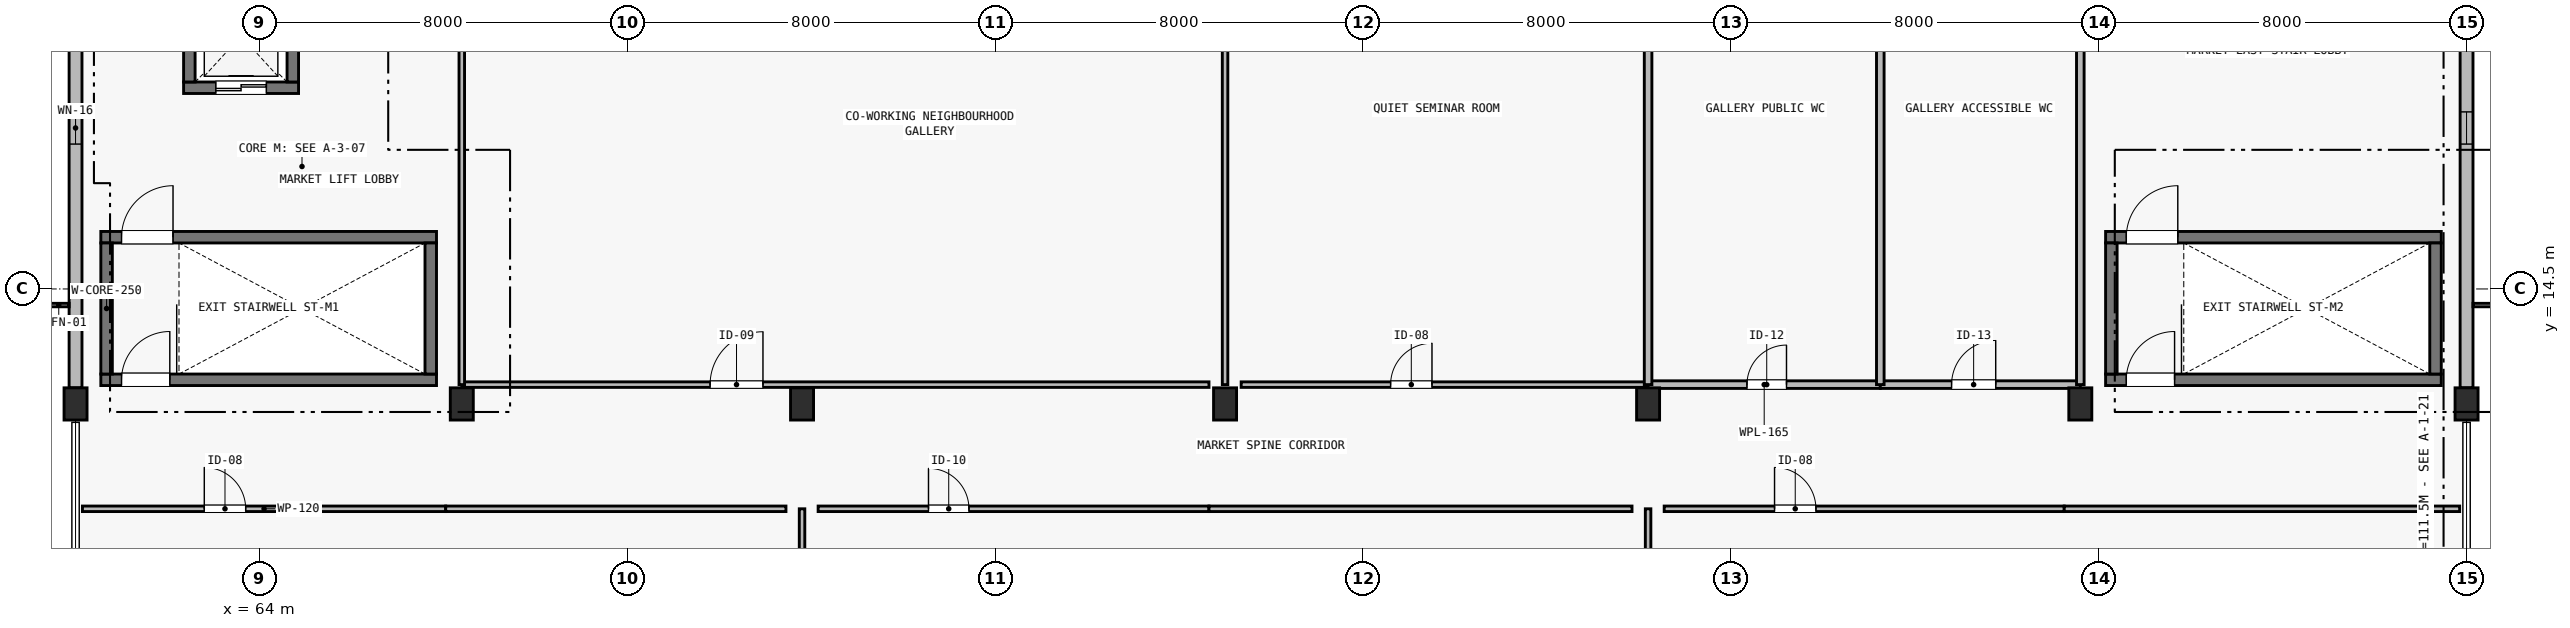
"""IFC4 building model, lengths in metres.
Left out: names, types, materials, properties, quantities, classifications, styles, units other than length and angle.
Written with IfcOpenShell. Run it as: python <this file> out.ifc"""

import sys

from ifc_helpers import new_model, si_unit, direction, frame, frame_2d, origin, origin_2d, place, context, subcontext, project, spatial, rectangle, extrude, element, fill, save


model = new_model("IFC4")
c1 = context("Model", 3, precision=1e-05, world=origin(), true_north=direction((0.0, 1.0)))
c2 = subcontext(c1, "Body", "Model", "MODEL_VIEW")
j1 = project(units=[si_unit("LENGTHUNIT", "METRE"), si_unit("PLANEANGLEUNIT", "RADIAN")], contexts=[c1])
p1 = place(None, origin())
s1 = spatial("IfcSite", under=j1, at=p1, CompositionType="ELEMENT")
p2 = place(p1, origin())
s2 = spatial("IfcBuilding", under=s1, at=p2, CompositionType="ELEMENT")
p3 = place(p2, frame((0.0, 0.0, 8.4)))
s3 = spatial("IfcBuildingStorey", under=s2, at=p3, CompositionType="ELEMENT", Elevation=8.4)
p4 = place(p3, frame((60.55, 12.525, 0.0), z_axis=(0.0, 0.0, 1.0), x_axis=(1.0, 0.0, 0.0)))
e1 = element("IfcWall", 1, at=p4, inside=s3, PredefinedType="SHEAR", context=c2, shape_type="SweptSolid", body=[
    extrude(rectangle(XDim=7.3, YDim=0.25, at=frame_2d((3.65, 0.0))), origin(), (0.0, 0.0, 1.0), 3.25),
])
p5 = place(p4, frame((0.45, 0.0, 0.0)))
e2 = element("IfcOpeningElement", 2, at=p5, cuts=e1, PredefinedType="OPENING", context=c2, shape_type="SweptSolid", body=[
    extrude(rectangle(XDim=1.05, YDim=2.15, at=frame_2d((0.525, 1.075))), frame((0.0, 0.14, 0.0), z_axis=(0.0, -1.0, 0.0), x_axis=(1.0, 0.0, 0.0)), (0.0, 0.0, 1.0), 0.28),
])
p6 = place(p3, frame((60.55, 15.625, 0.0), z_axis=(0.0, 0.0, 1.0), x_axis=(1.0, 0.0, 0.0)))
e3 = element("IfcWall", 3, at=p6, inside=s3, PredefinedType="SHEAR", context=c2, shape_type="SweptSolid", body=[
    extrude(rectangle(XDim=7.3, YDim=0.25, at=frame_2d((3.65, 0.0))), origin(), (0.0, 0.0, 1.0), 3.25),
])
p7 = place(p6, frame((0.45, 0.0, 0.0)))
e4 = element("IfcOpeningElement", 4, at=p7, cuts=e3, PredefinedType="OPENING", context=c2, shape_type="SweptSolid", body=[
    extrude(rectangle(XDim=1.12, YDim=2.15, at=frame_2d((0.56, 1.075))), frame((0.0, 0.14, 0.0), z_axis=(0.0, -1.0, 0.0), x_axis=(1.0, 0.0, 0.0)), (0.0, 0.0, 1.0), 0.28),
])
for number, where, z_axis, x_axis in (
    (5, (60.675, 12.65, 0.0), (0.0, 0.0, 1.0), (0.0, 1.0, 0.0)),
    (6, (67.725, 12.65, 0.0), (0.0, 0.0, 1.0), (0.0, 1.0, 0.0)),
):
    element("IfcWall", number, at=place(p3, frame(where, z_axis=z_axis, x_axis=x_axis)), inside=s3, PredefinedType="SHEAR", context=c2, shape_type="SweptSolid", body=[
        extrude(rectangle(XDim=2.85, YDim=0.25, at=frame_2d((1.425, 0.0))), origin(), (0.0, 0.0, 1.0), 3.25),
    ])
p8 = place(p3, frame((104.15, 12.525, 0.0), z_axis=(0.0, 0.0, 1.0), x_axis=(1.0, 0.0, 0.0)))
e7 = element("IfcWall", 7, at=p8, inside=s3, PredefinedType="SHEAR", context=c2, shape_type="SweptSolid", body=[
    extrude(rectangle(XDim=7.3, YDim=0.25, at=frame_2d((3.65, 0.0))), origin(), (0.0, 0.0, 1.0), 3.25),
])
p9 = place(p8, frame((0.45, 0.0, 0.0)))
e8 = element("IfcOpeningElement", 8, at=p9, cuts=e7, PredefinedType="OPENING", context=c2, shape_type="SweptSolid", body=[
    extrude(rectangle(XDim=1.05, YDim=2.15, at=frame_2d((0.525, 1.075))), frame((0.0, 0.14, 0.0), z_axis=(0.0, -1.0, 0.0), x_axis=(1.0, 0.0, 0.0)), (0.0, 0.0, 1.0), 0.28),
])
p10 = place(p3, frame((104.15, 15.625, 0.0), z_axis=(0.0, 0.0, 1.0), x_axis=(1.0, 0.0, 0.0)))
e9 = element("IfcWall", 9, at=p10, inside=s3, PredefinedType="SHEAR", context=c2, shape_type="SweptSolid", body=[
    extrude(rectangle(XDim=7.3, YDim=0.25, at=frame_2d((3.65, 0.0))), origin(), (0.0, 0.0, 1.0), 3.25),
])
p11 = place(p10, frame((0.45, 0.0, 0.0)))
e10 = element("IfcOpeningElement", 10, at=p11, cuts=e9, PredefinedType="OPENING", context=c2, shape_type="SweptSolid", body=[
    extrude(rectangle(XDim=1.12, YDim=2.15, at=frame_2d((0.56, 1.075))), frame((0.0, 0.14, 0.0), z_axis=(0.0, -1.0, 0.0), x_axis=(1.0, 0.0, 0.0)), (0.0, 0.0, 1.0), 0.28),
])
for number, where, z_axis, x_axis in (
    (11, (104.275, 12.65, 0.0), (0.0, 0.0, 1.0), (0.0, 1.0, 0.0)),
    (12, (111.325, 12.65, 0.0), (0.0, 0.0, 1.0), (0.0, 1.0, 0.0)),
):
    element("IfcWall", number, at=place(p3, frame(where, z_axis=z_axis, x_axis=x_axis)), inside=s3, PredefinedType="SHEAR", context=c2, shape_type="SweptSolid", body=[
        extrude(rectangle(XDim=2.85, YDim=0.25, at=frame_2d((1.425, 0.0))), origin(), (0.0, 0.0, 1.0), 3.25),
    ])
p12 = place(p3, frame((62.35, 18.875, 0.0), z_axis=(0.0, 0.0, 1.0), x_axis=(1.0, 0.0, 0.0)))
e13 = element("IfcWall", 13, at=p12, inside=s3, PredefinedType="SHEAR", context=c2, shape_type="SweptSolid", body=[
    extrude(rectangle(XDim=2.5, YDim=0.25, at=frame_2d((1.25, 0.0))), origin(), (0.0, 0.0, 1.0), 3.25),
])
p13 = place(p12, frame((0.7, 0.0, 0.0)))
e14 = element("IfcOpeningElement", 14, at=p13, cuts=e13, PredefinedType="OPENING", context=c2, shape_type="SweptSolid", body=[
    extrude(rectangle(XDim=1.1, YDim=2.15, at=frame_2d((0.55, 1.075))), frame((0.0, 0.14, 0.0), z_axis=(0.0, -1.0, 0.0), x_axis=(1.0, 0.0, 0.0)), (0.0, 0.0, 1.0), 0.28),
])
for number, where, z_axis, x_axis in (
    (15, (62.475, 19.0, 0.0), (0.0, 0.0, 1.0), (0.0, 1.0, 0.0)),
    (16, (64.725, 19.0, 0.0), (0.0, 0.0, 1.0), (0.0, 1.0, 0.0)),
):
    element("IfcWall", number, at=place(p3, frame(where, z_axis=z_axis, x_axis=x_axis)), inside=s3, PredefinedType="SHEAR", context=c2, shape_type="SweptSolid", body=[
        extrude(rectangle(XDim=2.0, YDim=0.25, at=frame_2d((1.0, 0.0))), origin(), (0.0, 0.0, 1.0), 3.25),
    ])
for number, where, z_axis, x_axis in (
    (17, (60.0, 12.0, 0.0), (0.0, 0.0, 1.0), (1.0, 0.0, 0.0)),
    (18, (68.4, 12.0, 0.0), (0.0, 0.0, 1.0), (1.0, 0.0, 0.0)),
    (19, (75.8, 12.0, 0.0), (0.0, 0.0, 1.0), (1.0, 0.0, 0.0)),
    (20, (85.0, 12.0, 0.0), (0.0, 0.0, 1.0), (1.0, 0.0, 0.0)),
    (21, (94.2, 12.0, 0.0), (0.0, 0.0, 1.0), (1.0, 0.0, 0.0)),
    (22, (103.6, 12.0, 0.0), (0.0, 0.0, 1.0), (1.0, 0.0, 0.0)),
    (23, (112.0, 12.0, 0.0), (0.0, 0.0, 1.0), (1.0, 0.0, 0.0)),
):
    element("IfcColumn", number, at=place(p3, frame(where, z_axis=z_axis, x_axis=x_axis)), inside=s3, PredefinedType="COLUMN", context=c2, shape_type="SweptSolid", body=[
        extrude(rectangle(XDim=0.5, YDim=0.7, at=origin_2d()), origin(), (0.0, 0.0, 1.0), 4.095),
    ])
p14 = place(p3, frame((60.0, 12.35, 0.0), z_axis=(0.0, 0.0, 1.0), x_axis=(0.0, 1.0, 0.0)))
e24 = element("IfcWall", 24, at=p14, inside=s3, PredefinedType="SOLIDWALL", context=c2, shape_type="SweptSolid", body=[
    extrude(rectangle(XDim=11.3, YDim=0.28, at=frame_2d((5.65, 0.0))), origin(), (0.0, 0.0, 1.0), 2.34),
])
p15 = place(p14, frame((5.3, 0.0, 0.16)))
e25 = element("IfcOpeningElement", 25, at=p15, cuts=e24, PredefinedType="OPENING", context=c2, shape_type="SweptSolid", body=[
    extrude(rectangle(XDim=0.7, YDim=2.14, at=frame_2d((0.35, 1.07))), frame((0.0, 0.155, 0.0), z_axis=(0.0, -1.0, 0.0), x_axis=(1.0, 0.0, 0.0)), (0.0, 0.0, 1.0), 0.31),
])
p16 = place(p3, frame((112.0, 23.65, 0.0), z_axis=(0.0, 0.0, 1.0), x_axis=(0.0, -1.0, 0.0)))
e26 = element("IfcWall", 26, at=p16, inside=s3, PredefinedType="SOLIDWALL", context=c2, shape_type="SweptSolid", body=[
    extrude(rectangle(XDim=11.3, YDim=0.28, at=frame_2d((5.65, 0.0))), origin(), (0.0, 0.0, 1.0), 2.34),
])
p17 = place(p16, frame((5.3, 0.0, 0.16)))
e27 = element("IfcOpeningElement", 27, at=p17, cuts=e26, PredefinedType="OPENING", context=c2, shape_type="SweptSolid", body=[
    extrude(rectangle(XDim=0.7, YDim=2.14, at=frame_2d((0.35, 1.07))), frame((0.0, 0.155, 0.0), z_axis=(0.0, -1.0, 0.0), x_axis=(1.0, 0.0, 0.0)), (0.0, 0.0, 1.0), 0.31),
])
p18 = place(p3, frame((60.15, 9.72, 0.0), z_axis=(0.0, 0.0, 1.0), x_axis=(1.0, 0.0, 0.0)))
e28 = element("IfcWall", 28, at=p18, inside=s3, PredefinedType="PARTITIONING", context=c2, shape_type="SweptSolid", body=[
    extrude(rectangle(XDim=7.9, YDim=0.12, at=frame_2d((3.95, 0.0))), origin(), (0.0, 0.0, 1.0), 2.98),
])
p19 = place(p18, frame((2.65, 0.0, 0.0)))
e29 = element("IfcOpeningElement", 29, at=p19, cuts=e28, PredefinedType="OPENING", context=c2, shape_type="SweptSolid", body=[
    extrude(rectangle(XDim=0.9, YDim=2.1, at=frame_2d((0.45, 1.05))), frame((0.0, 0.075, 0.0), z_axis=(0.0, -1.0, 0.0), x_axis=(1.0, 0.0, 0.0)), (0.0, 0.0, 1.0), 0.15),
])
p20 = place(p3, frame((68.05, 9.72, 0.0), z_axis=(0.0, 0.0, 1.0), x_axis=(1.0, 0.0, 0.0)))
e30 = element("IfcWall", 30, at=p20, inside=s3, PredefinedType="PARTITIONING", context=c2, shape_type="SweptSolid", body=[
    extrude(rectangle(XDim=7.4, YDim=0.12, at=frame_2d((3.7, 0.0))), origin(), (0.0, 0.0, 1.0), 2.98),
])
p21 = place(p3, frame((76.15, 9.72, 0.0), z_axis=(0.0, 0.0, 1.0), x_axis=(1.0, 0.0, 0.0)))
e31 = element("IfcWall", 31, at=p21, inside=s3, PredefinedType="PARTITIONING", context=c2, shape_type="SweptSolid", body=[
    extrude(rectangle(XDim=8.5, YDim=0.12, at=frame_2d((4.25, 0.0))), origin(), (0.0, 0.0, 1.0), 2.98),
])
p22 = place(p21, frame((2.4, 0.0, 0.0)))
e32 = element("IfcOpeningElement", 32, at=p22, cuts=e31, PredefinedType="OPENING", context=c2, shape_type="SweptSolid", body=[
    extrude(rectangle(XDim=0.88, YDim=2.1, at=frame_2d((0.44, 1.05))), frame((0.0, 0.075, 0.0), z_axis=(0.0, -1.0, 0.0), x_axis=(1.0, 0.0, 0.0)), (0.0, 0.0, 1.0), 0.15),
])
p23 = place(p3, frame((84.65, 9.72, 0.0), z_axis=(0.0, 0.0, 1.0), x_axis=(1.0, 0.0, 0.0)))
e33 = element("IfcWall", 33, at=p23, inside=s3, PredefinedType="PARTITIONING", context=c2, shape_type="SweptSolid", body=[
    extrude(rectangle(XDim=9.2, YDim=0.12, at=frame_2d((4.6, 0.0))), origin(), (0.0, 0.0, 1.0), 2.98),
])
p24 = place(p3, frame((94.55, 9.72, 0.0), z_axis=(0.0, 0.0, 1.0), x_axis=(1.0, 0.0, 0.0)))
e34 = element("IfcWall", 34, at=p24, inside=s3, PredefinedType="PARTITIONING", context=c2, shape_type="SweptSolid", body=[
    extrude(rectangle(XDim=8.7, YDim=0.12, at=frame_2d((4.35, 0.0))), origin(), (0.0, 0.0, 1.0), 2.98),
])
p25 = place(p24, frame((2.4, 0.0, 0.0)))
e35 = element("IfcOpeningElement", 35, at=p25, cuts=e34, PredefinedType="OPENING", context=c2, shape_type="SweptSolid", body=[
    extrude(rectangle(XDim=0.9, YDim=2.1, at=frame_2d((0.45, 1.05))), frame((0.0, 0.075, 0.0), z_axis=(0.0, -1.0, 0.0), x_axis=(1.0, 0.0, 0.0)), (0.0, 0.0, 1.0), 0.15),
])
p26 = place(p3, frame((103.25, 9.72, 0.0), z_axis=(0.0, 0.0, 1.0), x_axis=(1.0, 0.0, 0.0)))
e36 = element("IfcWall", 36, at=p26, inside=s3, PredefinedType="PARTITIONING", context=c2, shape_type="SweptSolid", body=[
    extrude(rectangle(XDim=8.6, YDim=0.12, at=frame_2d((4.3, 0.0))), origin(), (0.0, 0.0, 1.0), 2.98),
])
for number, where, z_axis, x_axis in (
    (37, (75.8, 0.12, 0.0), (0.0, 0.0, 1.0), (0.0, 1.0, 0.0)),
    (38, (94.2, 0.12, 0.0), (0.0, 0.0, 1.0), (0.0, 1.0, 0.0)),
):
    element("IfcWall", number, at=place(p3, frame(where, z_axis=z_axis, x_axis=x_axis)), inside=s3, PredefinedType="PARTITIONING", context=c2, shape_type="SweptSolid", body=[
        extrude(rectangle(XDim=9.6, YDim=0.12, at=frame_2d((4.8, 0.0))), origin(), (0.0, 0.0, 1.0), 2.35),
    ])
p27 = place(p3, frame((68.4, 12.42, 0.0), z_axis=(0.0, 0.0, 1.0), x_axis=(1.0, 0.0, 0.0)))
e39 = element("IfcWall", 39, at=p27, inside=s3, PredefinedType="PARTITIONING", context=c2, shape_type="SweptSolid", body=[
    extrude(rectangle(XDim=16.25, YDim=0.12, at=frame_2d((8.125, 0.0))), origin(), (0.0, 0.0, 1.0), 2.98),
])
p28 = place(p27, frame((5.4, 0.0, 0.0)))
e40 = element("IfcOpeningElement", 40, at=p28, cuts=e39, PredefinedType="OPENING", context=c2, shape_type="SweptSolid", body=[
    extrude(rectangle(XDim=1.15, YDim=2.15, at=frame_2d((0.575, 1.075))), frame((0.0, 0.075, 0.0), z_axis=(0.0, -1.0, 0.0), x_axis=(1.0, 0.0, 0.0)), (0.0, 0.0, 1.0), 0.15),
])
p29 = place(p3, frame((85.35, 12.42, 0.0), z_axis=(0.0, 0.0, 1.0), x_axis=(1.0, 0.0, 0.0)))
e41 = element("IfcWall", 41, at=p29, inside=s3, PredefinedType="PARTITIONING", context=c2, shape_type="SweptSolid", body=[
    extrude(rectangle(XDim=8.85, YDim=0.12, at=frame_2d((4.425, 0.0))), origin(), (0.0, 0.0, 1.0), 2.98),
])
p30 = place(p29, frame((3.25, 0.0, 0.0)))
e42 = element("IfcOpeningElement", 42, at=p30, cuts=e41, PredefinedType="OPENING", context=c2, shape_type="SweptSolid", body=[
    extrude(rectangle(XDim=0.9, YDim=2.1, at=frame_2d((0.45, 1.05))), frame((0.0, 0.075, 0.0), z_axis=(0.0, -1.0, 0.0), x_axis=(1.0, 0.0, 0.0)), (0.0, 0.0, 1.0), 0.15),
])
p31 = place(p3, frame((94.2, 12.42, 0.0), z_axis=(0.0, 0.0, 1.0), x_axis=(1.0, 0.0, 0.0)))
e43 = element("IfcWall", 43, at=p31, inside=s3, PredefinedType="PLUMBINGWALL", context=c2, shape_type="SweptSolid", body=[
    extrude(rectangle(XDim=5.05, YDim=0.165, at=frame_2d((2.525, 0.0))), origin(), (0.0, 0.0, 1.0), 2.98),
])
p32 = place(p31, frame((2.15, 0.0, 0.0)))
e44 = element("IfcOpeningElement", 44, at=p32, cuts=e43, PredefinedType="OPENING", context=c2, shape_type="SweptSolid", body=[
    extrude(rectangle(XDim=0.86, YDim=2.1, at=frame_2d((0.43, 1.05))), frame((0.0, 0.097, 0.0), z_axis=(0.0, -1.0, 0.0), x_axis=(1.0, 0.0, 0.0)), (0.0, 0.0, 1.0), 0.195),
])
p33 = place(p3, frame((99.25, 12.42, 0.0), z_axis=(0.0, 0.0, 1.0), x_axis=(1.0, 0.0, 0.0)))
e45 = element("IfcWall", 45, at=p33, inside=s3, PredefinedType="PLUMBINGWALL", context=c2, shape_type="SweptSolid", body=[
    extrude(rectangle(XDim=4.35, YDim=0.165, at=frame_2d((2.175, 0.0))), origin(), (0.0, 0.0, 1.0), 2.98),
])
p34 = place(p33, frame((1.55, 0.0, 0.0)))
e46 = element("IfcOpeningElement", 46, at=p34, cuts=e45, PredefinedType="OPENING", context=c2, shape_type="SweptSolid", body=[
    extrude(rectangle(XDim=0.96, YDim=2.12, at=frame_2d((0.48, 1.06))), frame((0.0, 0.097, 0.0), z_axis=(0.0, -1.0, 0.0), x_axis=(1.0, 0.0, 0.0)), (0.0, 0.0, 1.0), 0.195),
])
for number, where, z_axis, x_axis in (
    (47, (68.4, 12.42, 0.0), (0.0, 0.0, 1.0), (0.0, 1.0, 0.0)),
    (48, (85.0, 12.42, 0.0), (0.0, 0.0, 1.0), (0.0, 1.0, 0.0)),
):
    element("IfcWall", number, at=place(p3, frame(where, z_axis=z_axis, x_axis=x_axis)), inside=s3, PredefinedType="PARTITIONING", context=c2, shape_type="SweptSolid", body=[
        extrude(rectangle(XDim=11.54, YDim=0.12, at=frame_2d((5.77, 0.0))), origin(), (0.0, 0.0, 1.0), 2.35),
    ])
p35 = place(p3, frame((94.2, 12.42, 0.0), z_axis=(0.0, 0.0, 1.0), x_axis=(0.0, 1.0, 0.0)))
e49 = element("IfcWall", 49, at=p35, inside=s3, PredefinedType="PLUMBINGWALL", context=c2, shape_type="SweptSolid", body=[
    extrude(rectangle(XDim=11.54, YDim=0.165, at=frame_2d((5.77, 0.0))), origin(), (0.0, 0.0, 1.0), 2.35),
])
p36 = place(p3, frame((99.25, 12.42, 0.0), z_axis=(0.0, 0.0, 1.0), x_axis=(0.0, 1.0, 0.0)))
e50 = element("IfcWall", 50, at=p36, inside=s3, PredefinedType="PLUMBINGWALL", context=c2, shape_type="SweptSolid", body=[
    extrude(rectangle(XDim=11.54, YDim=0.165, at=frame_2d((5.77, 0.0))), origin(), (0.0, 0.0, 1.0), 2.98),
])
p37 = place(p3, frame((103.6, 12.42, 0.0), z_axis=(0.0, 0.0, 1.0), x_axis=(0.0, 1.0, 0.0)))
e51 = element("IfcWall", 51, at=p37, inside=s3, PredefinedType="PLUMBINGWALL", context=c2, shape_type="SweptSolid", body=[
    extrude(rectangle(XDim=11.54, YDim=0.165, at=frame_2d((5.77, 0.0))), origin(), (0.0, 0.0, 1.0), 2.35),
])
p38 = place(p15, origin())
e52 = element("IfcWindow", 52, at=p38, inside=s3, PartitioningType="SINGLE_PANEL", PredefinedType="WINDOW", context=c2, shape_type="SweptSolid", body=[
    extrude(rectangle(XDim=0.7, YDim=2.14, at=frame_2d((0.35, 1.07))), frame((0.0, 0.03, 0.0), z_axis=(0.0, -1.0, 0.0), x_axis=(1.0, 0.0, 0.0)), (0.0, 0.0, 1.0), 0.06),
])
fill(e25, e52)
p39 = place(p17, origin())
e53 = element("IfcWindow", 53, at=p39, inside=s3, PartitioningType="SINGLE_PANEL", PredefinedType="WINDOW", context=c2, shape_type="SweptSolid", body=[
    extrude(rectangle(XDim=0.7, YDim=2.14, at=frame_2d((0.35, 1.07))), frame((0.0, 0.03, 0.0), z_axis=(0.0, -1.0, 0.0), x_axis=(1.0, 0.0, 0.0)), (0.0, 0.0, 1.0), 0.06),
])
fill(e27, e53)
p40 = place(p19, origin())
e54 = element("IfcDoor", 54, at=p40, inside=s3, OperationType="SINGLE_SWING_LEFT", PredefinedType="DOOR", context=c2, shape_type="SweptSolid", body=[
    extrude(rectangle(XDim=0.9, YDim=2.1, at=frame_2d((0.45, 1.05))), frame((0.0, 0.025, 0.0), z_axis=(0.0, -1.0, 0.0), x_axis=(1.0, 0.0, 0.0)), (0.0, 0.0, 1.0), 0.05),
])
fill(e29, e54)
p41 = place(p22, origin())
e55 = element("IfcDoor", 55, at=p41, inside=s3, OperationType="SINGLE_SWING_LEFT", PredefinedType="DOOR", context=c2, shape_type="SweptSolid", body=[
    extrude(rectangle(XDim=0.88, YDim=2.1, at=frame_2d((0.44, 1.05))), frame((0.0, 0.025, 0.0), z_axis=(0.0, -1.0, 0.0), x_axis=(1.0, 0.0, 0.0)), (0.0, 0.0, 1.0), 0.05),
])
fill(e32, e55)
p42 = place(p25, origin())
e56 = element("IfcDoor", 56, at=p42, inside=s3, OperationType="SINGLE_SWING_LEFT", PredefinedType="DOOR", context=c2, shape_type="SweptSolid", body=[
    extrude(rectangle(XDim=0.9, YDim=2.1, at=frame_2d((0.45, 1.05))), frame((0.0, 0.025, 0.0), z_axis=(0.0, -1.0, 0.0), x_axis=(1.0, 0.0, 0.0)), (0.0, 0.0, 1.0), 0.05),
])
fill(e35, e56)
p43 = place(p28, origin())
e57 = element("IfcDoor", 57, at=p43, inside=s3, OperationType="SINGLE_SWING_RIGHT", PredefinedType="DOOR", context=c2, shape_type="SweptSolid", body=[
    extrude(rectangle(XDim=1.15, YDim=2.15, at=frame_2d((0.575, 1.075))), frame((0.0, 0.025, 0.0), z_axis=(0.0, -1.0, 0.0), x_axis=(1.0, 0.0, 0.0)), (0.0, 0.0, 1.0), 0.05),
])
fill(e40, e57)
p44 = place(p30, origin())
e58 = element("IfcDoor", 58, at=p44, inside=s3, OperationType="SINGLE_SWING_RIGHT", PredefinedType="DOOR", context=c2, shape_type="SweptSolid", body=[
    extrude(rectangle(XDim=0.9, YDim=2.1, at=frame_2d((0.45, 1.05))), frame((0.0, 0.025, 0.0), z_axis=(0.0, -1.0, 0.0), x_axis=(1.0, 0.0, 0.0)), (0.0, 0.0, 1.0), 0.05),
])
fill(e42, e58)
p45 = place(p32, origin())
e59 = element("IfcDoor", 59, at=p45, inside=s3, OperationType="SINGLE_SWING_RIGHT", PredefinedType="DOOR", context=c2, shape_type="SweptSolid", body=[
    extrude(rectangle(XDim=0.86, YDim=2.1, at=frame_2d((0.43, 1.05))), frame((0.0, 0.025, 0.0), z_axis=(0.0, -1.0, 0.0), x_axis=(1.0, 0.0, 0.0)), (0.0, 0.0, 1.0), 0.05),
])
fill(e44, e59)
p46 = place(p34, origin())
e60 = element("IfcDoor", 60, at=p46, inside=s3, OperationType="SINGLE_SWING_RIGHT", PredefinedType="DOOR", context=c2, shape_type="SweptSolid", body=[
    extrude(rectangle(XDim=0.96, YDim=2.12, at=frame_2d((0.48, 1.06))), frame((0.0, 0.025, 0.0), z_axis=(0.0, -1.0, 0.0), x_axis=(1.0, 0.0, 0.0)), (0.0, 0.0, 1.0), 0.05),
])
fill(e46, e60)
p47 = place(p5, origin())
e61 = element("IfcDoor", 61, at=p47, inside=s3, OperationType="SINGLE_SWING_RIGHT", PredefinedType="DOOR", context=c2, shape_type="SweptSolid", body=[
    extrude(rectangle(XDim=1.05, YDim=2.15, at=frame_2d((0.525, 1.075))), frame((0.0, 0.025, 0.0), z_axis=(0.0, -1.0, 0.0), x_axis=(1.0, 0.0, 0.0)), (0.0, 0.0, 1.0), 0.05),
])
fill(e2, e61)
p48 = place(p7, origin())
e62 = element("IfcDoor", 62, at=p48, inside=s3, OperationType="SINGLE_SWING_RIGHT", PredefinedType="DOOR", context=c2, shape_type="SweptSolid", body=[
    extrude(rectangle(XDim=1.12, YDim=2.15, at=frame_2d((0.56, 1.075))), frame((0.0, 0.025, 0.0), z_axis=(0.0, -1.0, 0.0), x_axis=(1.0, 0.0, 0.0)), (0.0, 0.0, 1.0), 0.05),
])
fill(e4, e62)
p49 = place(p9, origin())
e63 = element("IfcDoor", 63, at=p49, inside=s3, OperationType="SINGLE_SWING_RIGHT", PredefinedType="DOOR", context=c2, shape_type="SweptSolid", body=[
    extrude(rectangle(XDim=1.05, YDim=2.15, at=frame_2d((0.525, 1.075))), frame((0.0, 0.025, 0.0), z_axis=(0.0, -1.0, 0.0), x_axis=(1.0, 0.0, 0.0)), (0.0, 0.0, 1.0), 0.05),
])
fill(e8, e63)
p50 = place(p11, origin())
e64 = element("IfcDoor", 64, at=p50, inside=s3, OperationType="SINGLE_SWING_RIGHT", PredefinedType="DOOR", context=c2, shape_type="SweptSolid", body=[
    extrude(rectangle(XDim=1.12, YDim=2.15, at=frame_2d((0.56, 1.075))), frame((0.0, 0.025, 0.0), z_axis=(0.0, -1.0, 0.0), x_axis=(1.0, 0.0, 0.0)), (0.0, 0.0, 1.0), 0.05),
])
fill(e10, e64)
p51 = place(p13, origin())
e65 = element("IfcDoor", 65, at=p51, inside=s3, OperationType="DOUBLE_DOOR_SLIDING", PredefinedType="DOOR", context=c2, shape_type="SweptSolid", body=[
    extrude(rectangle(XDim=1.1, YDim=2.15, at=frame_2d((0.55, 1.075))), frame((0.0, 0.025, 0.0), z_axis=(0.0, -1.0, 0.0), x_axis=(1.0, 0.0, 0.0)), (0.0, 0.0, 1.0), 0.05),
])
fill(e14, e65)
save(model, sys.argv[1])
